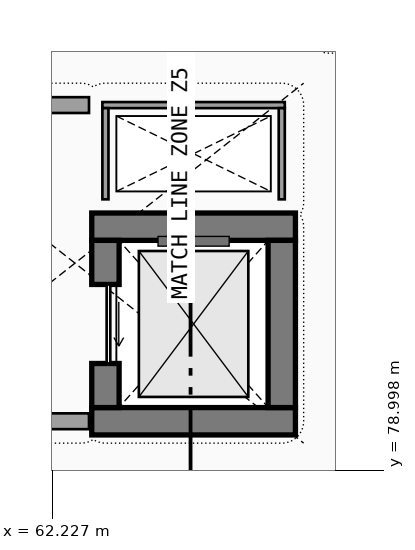
"""IFC4 building model, lengths in metres.
Left out: names, types, materials, properties, quantities, classifications, styles, units other than length and angle.
Written with IfcOpenShell. Run it as: python <this file> out.ifc"""

import sys

from ifc_helpers import new_model, si_unit, direction, frame, frame_2d, origin, place, context, subcontext, project, spatial, rectangle, extrude, element, fill, save


model = new_model("IFC4")
c1 = context("Model", 3, precision=1e-05, world=origin(), true_north=direction((0.0, 1.0)))
c2 = subcontext(c1, "Body", "Model", "MODEL_VIEW")
j1 = project(units=[si_unit("LENGTHUNIT", "METRE"), si_unit("PLANEANGLEUNIT", "RADIAN")], contexts=[c1])
p1 = place(None, origin())
s1 = spatial("IfcSite", under=j1, at=p1, CompositionType="ELEMENT")
p2 = place(p1, origin())
s2 = spatial("IfcBuilding", under=s1, at=p2, CompositionType="ELEMENT")
p3 = place(p2, origin())
s3 = spatial("IfcBuildingStorey", under=s2, at=p3, CompositionType="ELEMENT", Elevation=0.0)
for number, where, z_axis, x_axis in (
    (1, (62.875, 79.8, 0.0), (0.0, 0.0, 1.0), (1.0, 0.0, 0.0)),
    (2, (66.225, 83.0, 0.0), (0.0, 0.0, 1.0), (-1.0, 0.0, 0.0)),
):
    element("IfcWall", number, at=place(p3, frame(where, z_axis=z_axis, x_axis=x_axis)), inside=s3, PredefinedType="SHEAR", context=c2, shape_type="SweptSolid", body=[
        extrude(rectangle(XDim=3.35, YDim=0.45, at=frame_2d((1.675, 0.0))), origin(), (0.0, 0.0, 1.0), 4.5),
    ])
p4 = place(p3, frame((63.1, 82.775, 0.0), z_axis=(0.0, 0.0, 1.0), x_axis=(0.0, -1.0, 0.0)))
e3 = element("IfcWall", 3, at=p4, inside=s3, PredefinedType="SHEAR", context=c2, shape_type="SweptSolid", body=[
    extrude(rectangle(XDim=2.75, YDim=0.45, at=frame_2d((1.375, 0.0))), origin(), (0.0, 0.0, 1.0), 4.5),
])
p5 = place(p4, frame((0.725, 0.0, 0.0), z_axis=(0.0, 0.0, 1.0), x_axis=(1.0, 0.0, 0.0)))
e4 = element("IfcOpeningElement", 4, at=p5, cuts=e3, PredefinedType="OPENING", context=c2, shape_type="SweptSolid", body=[
    extrude(rectangle(XDim=1.3, YDim=2.25, at=frame_2d((0.65, 1.125))), frame((0.0, 0.235, 0.0), z_axis=(0.0, -1.0, 0.0), x_axis=(1.0, 0.0, 0.0)), (0.0, 0.0, 1.0), 0.47),
])
p6 = place(p3, frame((66.0, 80.025, 0.0), z_axis=(0.0, 0.0, 1.0), x_axis=(0.0, 1.0, 0.0)))
e5 = element("IfcWall", 5, at=p6, inside=s3, PredefinedType="SHEAR", context=c2, shape_type="SweptSolid", body=[
    extrude(rectangle(XDim=2.75, YDim=0.45, at=frame_2d((1.375, 0.0))), origin(), (0.0, 0.0, 1.0), 4.5),
])
p7 = place(p3, frame((66.05, 85.0, 0.0), z_axis=(0.0, 0.0, 1.0), x_axis=(-1.0, 0.0, 0.0)))
e6 = element("IfcWall", 6, at=p7, inside=s3, PredefinedType="PARTITIONING", context=c2, shape_type="SweptSolid", body=[
    extrude(rectangle(XDim=3.0, YDim=0.1, at=frame_2d((1.5, 0.0))), origin(), (0.0, 0.0, 1.0), 4.5),
])
for number, where, z_axis, x_axis in (
    (7, (63.1, 84.95, 0.0), (0.0, 0.0, 1.0), (0.0, -1.0, 0.0)),
    (8, (66.0, 83.45, 0.0), (0.0, 0.0, 1.0), (0.0, 1.0, 0.0)),
):
    element("IfcWall", number, at=place(p3, frame(where, z_axis=z_axis, x_axis=x_axis)), inside=s3, PredefinedType="PARTITIONING", context=c2, shape_type="SweptSolid", body=[
        extrude(rectangle(XDim=1.5, YDim=0.1, at=frame_2d((0.75, 0.0))), origin(), (0.0, 0.0, 1.0), 4.5),
    ])
p8 = place(p3, frame((59.07, 79.8, 0.0), z_axis=(0.0, 0.0, 1.0), x_axis=(1.0, 0.0, 0.0)))
e9 = element("IfcWall", 9, at=p8, inside=s3, PredefinedType="SOLIDWALL", context=c2, shape_type="SweptSolid", body=[
    extrude(rectangle(XDim=3.76, YDim=0.26, at=frame_2d((1.88, 0.0))), origin(), (0.0, 0.0, 1.0), 4.5),
])
p9 = place(p3, frame((62.83, 85.0, 0.0), z_axis=(0.0, 0.0, 1.0), x_axis=(-1.0, 0.0, 0.0)))
e10 = element("IfcWall", 10, at=p9, inside=s3, PredefinedType="SOLIDWALL", context=c2, shape_type="SweptSolid", body=[
    extrude(rectangle(XDim=3.76, YDim=0.26, at=frame_2d((1.88, 0.0))), origin(), (0.0, 0.0, 1.0), 4.5),
])
p10 = place(p9, frame((2.805, 0.0, 0.0), z_axis=(0.0, 0.0, 1.0), x_axis=(-1.0, 0.0, 0.0)))
e11 = element("IfcOpeningElement", 11, at=p10, cuts=e10, PredefinedType="OPENING", context=c2, shape_type="SweptSolid", body=[
    extrude(rectangle(XDim=1.85, YDim=2.25, at=frame_2d((0.925, 1.125))), frame((0.0, 0.14, 0.0), z_axis=(0.0, -1.0, 0.0), x_axis=(1.0, 0.0, 0.0)), (0.0, 0.0, 1.0), 0.28),
])
p11 = place(p5, origin())
e12 = element("IfcDoor", 12, at=p11, inside=s3, OperationType="SLIDING_TO_RIGHT", PredefinedType="DOOR", context=c2, shape_type="SweptSolid", body=[
    extrude(rectangle(XDim=1.3, YDim=2.25, at=frame_2d((0.65, 1.125))), frame((0.0, 0.025, 0.0), z_axis=(0.0, -1.0, 0.0), x_axis=(1.0, 0.0, 0.0)), (0.0, 0.0, 1.0), 0.05),
])
fill(e4, e12)
save(model, sys.argv[1])
